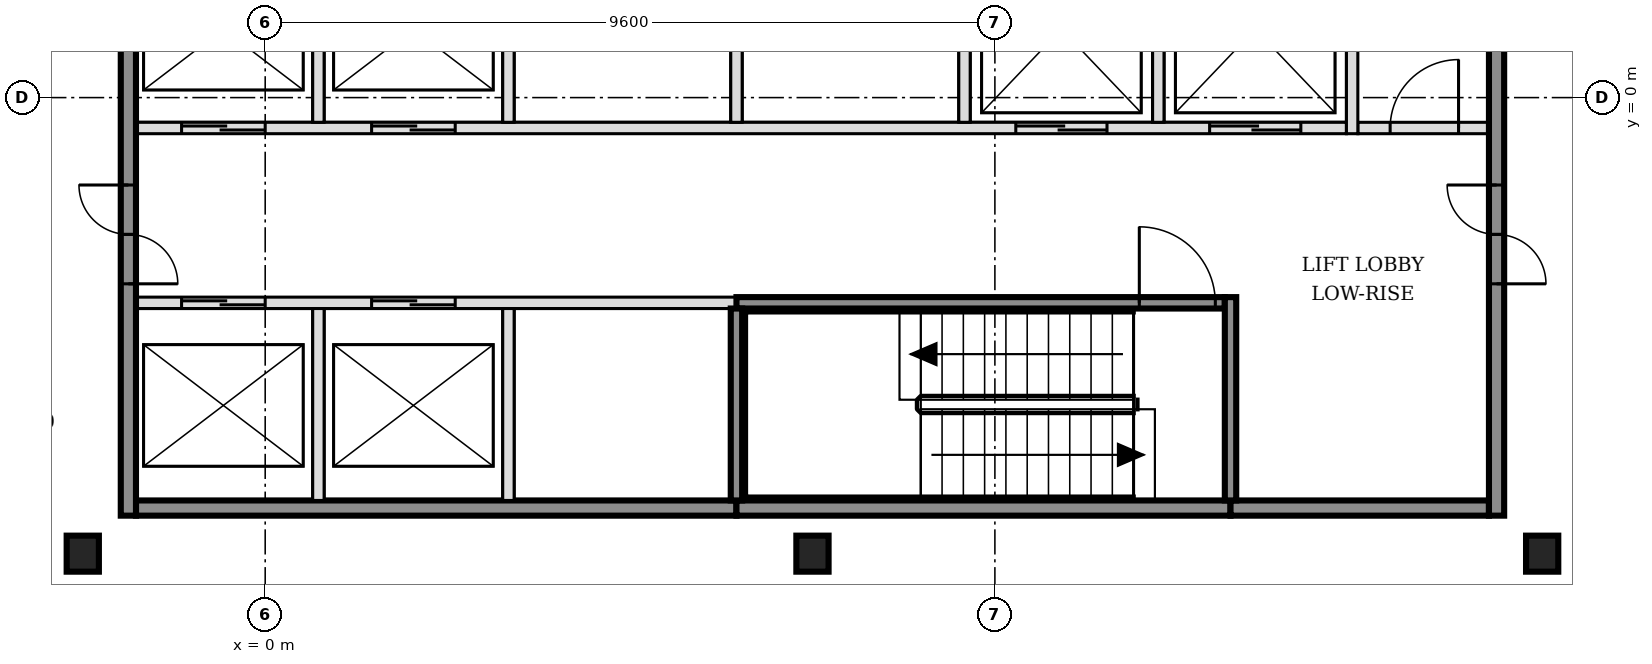
"""IFC4 building model, lengths in metres.
Left out: names, types, materials, properties, quantities, classifications, styles, units other than length and angle.
Written with IfcOpenShell. Run it as: python <this file> out.ifc"""

import sys

from ifc_helpers import new_model, si_unit, direction, frame, frame_2d, origin, origin_2d, place, context, subcontext, project, spatial, rectangle, i_section, extrude, element, fill, save


model = new_model("IFC4")
c1 = context("Model", 3, precision=1e-05, world=origin(), true_north=direction((0.0, 1.0)))
c2 = subcontext(c1, "Body", "Model", "MODEL_VIEW")
j1 = project(units=[si_unit("LENGTHUNIT", "METRE"), si_unit("PLANEANGLEUNIT", "RADIAN")], contexts=[c1])
p1 = place(None, origin())
s1 = spatial("IfcSite", under=j1, at=p1, CompositionType="ELEMENT")
p2 = place(p1, origin())
s2 = spatial("IfcBuilding", under=s1, at=p2, CompositionType="ELEMENT")
p3 = place(p2, frame((0.0, 0.0, 115.8)))
s3 = spatial("IfcBuildingStorey", under=s2, at=p3, CompositionType="ELEMENT", Elevation=115.8)
for number, where, z_axis, x_axis in (
    (1, (-2.4, -6.0, -0.15), (0.0, 0.0, 1.0), (1.0, 0.0, 0.0)),
    (2, (7.2, -6.0, -0.15), (0.0, 0.0, 1.0), (1.0, 0.0, 0.0)),
    (3, (16.8, -6.0, -0.15), (0.0, 0.0, 1.0), (1.0, 0.0, 0.0)),
):
    element("IfcColumn", number, at=place(p3, frame(where, z_axis=z_axis, x_axis=x_axis)), inside=s3, PredefinedType="COLUMN", context=c2, shape_type="SweptSolid", body=[
        extrude(i_section(OverallWidth=0.424, OverallDepth=0.474, WebThickness=0.048, FlangeThickness=0.077, FilletRadius=0.015, at=origin_2d()), origin(), (0.0, 0.0, 1.0), 3.5),
    ])
p4 = place(p3, frame((-1.7, -5.4, 0.0), z_axis=(0.0, 0.0, 1.0), x_axis=(1.0, 0.0, 0.0)))
e4 = element("IfcWall", 4, at=p4, inside=s3, PredefinedType="SOLIDWALL", context=c2, shape_type="SweptSolid", body=[
    extrude(rectangle(XDim=7.9, YDim=0.2, at=frame_2d((3.95, 0.0))), origin(), (0.0, 0.0, 1.0), 3.35),
])
p5 = place(p3, frame((6.2, -5.4, 0.0), z_axis=(0.0, 0.0, 1.0), x_axis=(1.0, 0.0, 0.0)))
e5 = element("IfcWall", 5, at=p5, inside=s3, PredefinedType="SOLIDWALL", context=c2, shape_type="SweptSolid", body=[
    extrude(rectangle(XDim=6.5, YDim=0.2, at=frame_2d((3.25, 0.0))), origin(), (0.0, 0.0, 1.0), 3.35),
])
p6 = place(p3, frame((12.7, -5.4, 0.0), z_axis=(0.0, 0.0, 1.0), x_axis=(1.0, 0.0, 0.0)))
e6 = element("IfcWall", 6, at=p6, inside=s3, PredefinedType="SOLIDWALL", context=c2, shape_type="SweptSolid", body=[
    extrude(rectangle(XDim=3.4, YDim=0.2, at=frame_2d((1.7, 0.0))), origin(), (0.0, 0.0, 1.0), 3.35),
])
p7 = place(p3, frame((-1.7, -2.7, 0.0), z_axis=(0.0, 0.0, 1.0), x_axis=(1.0, 0.0, 0.0)))
e7 = element("IfcWall", 7, at=p7, inside=s3, PredefinedType="SOLIDWALL", context=c2, shape_type="SweptSolid", body=[
    extrude(rectangle(XDim=7.9, YDim=0.15, at=frame_2d((3.95, 0.0))), origin(), (0.0, 0.0, 1.0), 3.35),
])
p8 = place(p7, frame((0.6, 0.0, 0.0)))
e8 = element("IfcOpeningElement", 8, at=p8, cuts=e7, PredefinedType="OPENING", context=c2, shape_type="SweptSolid", body=[
    extrude(rectangle(XDim=1.1, YDim=2.1, at=frame_2d((0.55, 1.05))), frame((0.0, 0.085, 0.0), z_axis=(0.0, -1.0, 0.0), x_axis=(1.0, 0.0, 0.0)), (0.0, 0.0, 1.0), 0.17),
])
p9 = place(p7, frame((3.1, 0.0, 0.0)))
e9 = element("IfcOpeningElement", 9, at=p9, cuts=e7, PredefinedType="OPENING", context=c2, shape_type="SweptSolid", body=[
    extrude(rectangle(XDim=1.1, YDim=2.1, at=frame_2d((0.55, 1.05))), frame((0.0, 0.085, 0.0), z_axis=(0.0, -1.0, 0.0), x_axis=(1.0, 0.0, 0.0)), (0.0, 0.0, 1.0), 0.17),
])
p10 = place(p3, frame((6.2, -2.7, 0.0), z_axis=(0.0, 0.0, 1.0), x_axis=(1.0, 0.0, 0.0)))
e10 = element("IfcWall", 10, at=p10, inside=s3, PredefinedType="SOLIDWALL", context=c2, shape_type="SweptSolid", body=[
    extrude(rectangle(XDim=6.425, YDim=0.15, at=frame_2d((3.212, 0.0))), origin(), (0.0, 0.0, 1.0), 3.35),
])
p11 = place(p10, frame((5.3, 0.0, 0.0)))
e11 = element("IfcOpeningElement", 11, at=p11, cuts=e10, PredefinedType="OPENING", context=c2, shape_type="SweptSolid", body=[
    extrude(rectangle(XDim=1.0, YDim=2.1, at=frame_2d((0.5, 1.05))), frame((0.0, 0.085, 0.0), z_axis=(0.0, -1.0, 0.0), x_axis=(1.0, 0.0, 0.0)), (0.0, 0.0, 1.0), 0.17),
])
p12 = place(p3, frame((-1.7, -0.4, 0.0), z_axis=(0.0, 0.0, 1.0), x_axis=(1.0, 0.0, 0.0)))
e12 = element("IfcWall", 12, at=p12, inside=s3, PredefinedType="SOLIDWALL", context=c2, shape_type="SweptSolid", body=[
    extrude(rectangle(XDim=15.925, YDim=0.15, at=frame_2d((7.962, 0.0))), origin(), (0.0, 0.0, 1.0), 3.35),
])
p13 = place(p12, frame((0.6, 0.0, 0.0)))
e13 = element("IfcOpeningElement", 13, at=p13, cuts=e12, PredefinedType="OPENING", context=c2, shape_type="SweptSolid", body=[
    extrude(rectangle(XDim=1.1, YDim=2.1, at=frame_2d((0.55, 1.05))), frame((0.0, 0.085, 0.0), z_axis=(0.0, -1.0, 0.0), x_axis=(1.0, 0.0, 0.0)), (0.0, 0.0, 1.0), 0.17),
])
p14 = place(p12, frame((3.1, 0.0, 0.0)))
e14 = element("IfcOpeningElement", 14, at=p14, cuts=e12, PredefinedType="OPENING", context=c2, shape_type="SweptSolid", body=[
    extrude(rectangle(XDim=1.1, YDim=2.1, at=frame_2d((0.55, 1.05))), frame((0.0, 0.085, 0.0), z_axis=(0.0, -1.0, 0.0), x_axis=(1.0, 0.0, 0.0)), (0.0, 0.0, 1.0), 0.17),
])
p15 = place(p12, frame((11.575, 0.0, 0.0)))
e15 = element("IfcOpeningElement", 15, at=p15, cuts=e12, PredefinedType="OPENING", context=c2, shape_type="SweptSolid", body=[
    extrude(rectangle(XDim=1.2, YDim=2.1, at=frame_2d((0.6, 1.05))), frame((0.0, 0.085, 0.0), z_axis=(0.0, -1.0, 0.0), x_axis=(1.0, 0.0, 0.0)), (0.0, 0.0, 1.0), 0.17),
])
p16 = place(p12, frame((14.125, 0.0, 0.0)))
e16 = element("IfcOpeningElement", 16, at=p16, cuts=e12, PredefinedType="OPENING", context=c2, shape_type="SweptSolid", body=[
    extrude(rectangle(XDim=1.2, YDim=2.1, at=frame_2d((0.6, 1.05))), frame((0.0, 0.085, 0.0), z_axis=(0.0, -1.0, 0.0), x_axis=(1.0, 0.0, 0.0)), (0.0, 0.0, 1.0), 0.17),
])
p17 = place(p3, frame((14.375, -0.4, 0.0), z_axis=(0.0, 0.0, 1.0), x_axis=(1.0, 0.0, 0.0)))
e17 = element("IfcWall", 17, at=p17, inside=s3, PredefinedType="PARTITIONING", context=c2, shape_type="SweptSolid", body=[
    extrude(rectangle(XDim=1.725, YDim=0.15, at=frame_2d((0.863, 0.0))), origin(), (0.0, 0.0, 1.0), 3.35),
])
p18 = place(p17, frame((0.425, 0.0, 0.0)))
e18 = element("IfcOpeningElement", 18, at=p18, cuts=e17, PredefinedType="OPENING", context=c2, shape_type="SweptSolid", body=[
    extrude(rectangle(XDim=0.9, YDim=2.1, at=frame_2d((0.45, 1.05))), frame((0.0, 0.085, 0.0), z_axis=(0.0, -1.0, 0.0), x_axis=(1.0, 0.0, 0.0)), (0.0, 0.0, 1.0), 0.17),
])
p19 = place(p3, frame((-1.8, -5.5, 0.0), z_axis=(0.0, 0.0, 1.0), x_axis=(0.0, 1.0, 0.0)))
e19 = element("IfcWall", 19, at=p19, inside=s3, PredefinedType="SOLIDWALL", context=c2, shape_type="SweptSolid", body=[
    extrude(rectangle(XDim=15.8, YDim=0.2, at=frame_2d((7.9, 0.0))), origin(), (0.0, 0.0, 1.0), 3.35),
])
p20 = place(p19, frame((3.05, 0.0, 0.0)))
e20 = element("IfcOpeningElement", 20, at=p20, cuts=e19, PredefinedType="OPENING", context=c2, shape_type="SweptSolid", body=[
    extrude(rectangle(XDim=1.3, YDim=2.1, at=frame_2d((0.65, 1.05))), frame((0.0, 0.11, 0.0), z_axis=(0.0, -1.0, 0.0), x_axis=(1.0, 0.0, 0.0)), (0.0, 0.0, 1.0), 0.22),
])
p21 = place(p19, frame((11.45, 0.0, 0.0)))
e21 = element("IfcOpeningElement", 21, at=p21, cuts=e19, PredefinedType="OPENING", context=c2, shape_type="SweptSolid", body=[
    extrude(rectangle(XDim=1.3, YDim=2.1, at=frame_2d((0.65, 1.05))), frame((0.0, 0.11, 0.0), z_axis=(0.0, -1.0, 0.0), x_axis=(1.0, 0.0, 0.0)), (0.0, 0.0, 1.0), 0.22),
])
p22 = place(p3, frame((0.7, -5.3, 0.0), z_axis=(0.0, 0.0, 1.0), x_axis=(0.0, 1.0, 0.0)))
e22 = element("IfcWall", 22, at=p22, inside=s3, PredefinedType="SOLIDWALL", context=c2, shape_type="SweptSolid", body=[
    extrude(rectangle(XDim=2.525, YDim=0.15, at=frame_2d((1.263, 0.0))), origin(), (0.0, 0.0, 1.0), 3.35),
])
p23 = place(p3, frame((0.7, -0.325, 0.0), z_axis=(0.0, 0.0, 1.0), x_axis=(0.0, 1.0, 0.0)))
e23 = element("IfcWall", 23, at=p23, inside=s3, PredefinedType="SOLIDWALL", context=c2, shape_type="SweptSolid", body=[
    extrude(rectangle(XDim=2.45, YDim=0.15, at=frame_2d((1.225, 0.0))), origin(), (0.0, 0.0, 1.0), 3.35),
])
p24 = place(p3, frame((3.2, -5.3, 0.0), z_axis=(0.0, 0.0, 1.0), x_axis=(0.0, 1.0, 0.0)))
e24 = element("IfcWall", 24, at=p24, inside=s3, PredefinedType="SOLIDWALL", context=c2, shape_type="SweptSolid", body=[
    extrude(rectangle(XDim=2.525, YDim=0.15, at=frame_2d((1.263, 0.0))), origin(), (0.0, 0.0, 1.0), 3.35),
])
p25 = place(p3, frame((3.2, -0.325, 0.0), z_axis=(0.0, 0.0, 1.0), x_axis=(0.0, 1.0, 0.0)))
e25 = element("IfcWall", 25, at=p25, inside=s3, PredefinedType="SOLIDWALL", context=c2, shape_type="SweptSolid", body=[
    extrude(rectangle(XDim=2.45, YDim=0.15, at=frame_2d((1.225, 0.0))), origin(), (0.0, 0.0, 1.0), 3.35),
])
p26 = place(p3, frame((6.2, -5.3, 0.0), z_axis=(0.0, 0.0, 1.0), x_axis=(0.0, 1.0, 0.0)))
e26 = element("IfcWall", 26, at=p26, inside=s3, PredefinedType="SOLIDWALL", context=c2, shape_type="SweptSolid", body=[
    extrude(rectangle(XDim=2.525, YDim=0.15, at=frame_2d((1.263, 0.0))), origin(), (0.0, 0.0, 1.0), 3.35),
])
for number, where, z_axis, x_axis in (
    (27, (6.2, -0.325, 0.0), (0.0, 0.0, 1.0), (0.0, 1.0, 0.0)),
    (28, (9.2, -0.325, 0.0), (0.0, 0.0, 1.0), (0.0, 1.0, 0.0)),
    (29, (11.75, -0.325, 0.0), (0.0, 0.0, 1.0), (0.0, 1.0, 0.0)),
):
    element("IfcWall", number, at=place(p3, frame(where, z_axis=z_axis, x_axis=x_axis)), inside=s3, PredefinedType="SOLIDWALL", context=c2, shape_type="SweptSolid", body=[
        extrude(rectangle(XDim=2.45, YDim=0.15, at=frame_2d((1.225, 0.0))), origin(), (0.0, 0.0, 1.0), 3.35),
    ])
p27 = place(p3, frame((12.7, -5.3, 0.0), z_axis=(0.0, 0.0, 1.0), x_axis=(0.0, 1.0, 0.0)))
e30 = element("IfcWall", 30, at=p27, inside=s3, PredefinedType="SOLIDWALL", context=c2, shape_type="SweptSolid", body=[
    extrude(rectangle(XDim=2.675, YDim=0.15, at=frame_2d((1.337, 0.0))), origin(), (0.0, 0.0, 1.0), 3.35),
])
p28 = place(p3, frame((14.3, -0.475, 0.0), z_axis=(0.0, 0.0, 1.0), x_axis=(0.0, 1.0, 0.0)))
e31 = element("IfcWall", 31, at=p28, inside=s3, PredefinedType="SOLIDWALL", context=c2, shape_type="SweptSolid", body=[
    extrude(rectangle(XDim=2.75, YDim=0.15, at=frame_2d((1.375, 0.0))), origin(), (0.0, 0.0, 1.0), 3.35),
])
p29 = place(p3, frame((16.2, -5.5, 0.0), z_axis=(0.0, 0.0, 1.0), x_axis=(0.0, 1.0, 0.0)))
e32 = element("IfcWall", 32, at=p29, inside=s3, PredefinedType="SOLIDWALL", context=c2, shape_type="SweptSolid", body=[
    extrude(rectangle(XDim=15.8, YDim=0.2, at=frame_2d((7.9, 0.0))), origin(), (0.0, 0.0, 1.0), 3.35),
])
p30 = place(p29, frame((3.05, 0.0, 0.0)))
e33 = element("IfcOpeningElement", 33, at=p30, cuts=e32, PredefinedType="OPENING", context=c2, shape_type="SweptSolid", body=[
    extrude(rectangle(XDim=1.3, YDim=2.1, at=frame_2d((0.65, 1.05))), frame((0.0, 0.11, 0.0), z_axis=(0.0, -1.0, 0.0), x_axis=(1.0, 0.0, 0.0)), (0.0, 0.0, 1.0), 0.22),
])
p31 = place(p29, frame((11.45, 0.0, 0.0)))
e34 = element("IfcOpeningElement", 34, at=p31, cuts=e32, PredefinedType="OPENING", context=c2, shape_type="SweptSolid", body=[
    extrude(rectangle(XDim=1.3, YDim=2.1, at=frame_2d((0.65, 1.05))), frame((0.0, 0.11, 0.0), z_axis=(0.0, -1.0, 0.0), x_axis=(1.0, 0.0, 0.0)), (0.0, 0.0, 1.0), 0.22),
])
p32 = place(p8, origin())
e35 = element("IfcDoor", 35, at=p32, inside=s3, OperationType="DOUBLE_DOOR_SLIDING", PredefinedType="DOOR", context=c2, shape_type="SweptSolid", body=[
    extrude(rectangle(XDim=1.1, YDim=2.1, at=frame_2d((0.55, 1.05))), frame((0.0, 0.025, 0.0), z_axis=(0.0, -1.0, 0.0), x_axis=(1.0, 0.0, 0.0)), (0.0, 0.0, 1.0), 0.05),
])
fill(e8, e35)
p33 = place(p9, origin())
e36 = element("IfcDoor", 36, at=p33, inside=s3, OperationType="DOUBLE_DOOR_SLIDING", PredefinedType="DOOR", context=c2, shape_type="SweptSolid", body=[
    extrude(rectangle(XDim=1.1, YDim=2.1, at=frame_2d((0.55, 1.05))), frame((0.0, 0.025, 0.0), z_axis=(0.0, -1.0, 0.0), x_axis=(1.0, 0.0, 0.0)), (0.0, 0.0, 1.0), 0.05),
])
fill(e9, e36)
p34 = place(p13, origin())
e37 = element("IfcDoor", 37, at=p34, inside=s3, OperationType="DOUBLE_DOOR_SLIDING", PredefinedType="DOOR", context=c2, shape_type="SweptSolid", body=[
    extrude(rectangle(XDim=1.1, YDim=2.1, at=frame_2d((0.55, 1.05))), frame((0.0, 0.025, 0.0), z_axis=(0.0, -1.0, 0.0), x_axis=(1.0, 0.0, 0.0)), (0.0, 0.0, 1.0), 0.05),
])
fill(e13, e37)
p35 = place(p14, origin())
e38 = element("IfcDoor", 38, at=p35, inside=s3, OperationType="DOUBLE_DOOR_SLIDING", PredefinedType="DOOR", context=c2, shape_type="SweptSolid", body=[
    extrude(rectangle(XDim=1.1, YDim=2.1, at=frame_2d((0.55, 1.05))), frame((0.0, 0.025, 0.0), z_axis=(0.0, -1.0, 0.0), x_axis=(1.0, 0.0, 0.0)), (0.0, 0.0, 1.0), 0.05),
])
fill(e14, e38)
p36 = place(p15, origin())
e39 = element("IfcDoor", 39, at=p36, inside=s3, OperationType="DOUBLE_DOOR_SLIDING", PredefinedType="DOOR", context=c2, shape_type="SweptSolid", body=[
    extrude(rectangle(XDim=1.2, YDim=2.1, at=frame_2d((0.6, 1.05))), frame((0.0, 0.025, 0.0), z_axis=(0.0, -1.0, 0.0), x_axis=(1.0, 0.0, 0.0)), (0.0, 0.0, 1.0), 0.05),
])
fill(e15, e39)
p37 = place(p16, origin())
e40 = element("IfcDoor", 40, at=p37, inside=s3, OperationType="DOUBLE_DOOR_SLIDING", PredefinedType="DOOR", context=c2, shape_type="SweptSolid", body=[
    extrude(rectangle(XDim=1.2, YDim=2.1, at=frame_2d((0.6, 1.05))), frame((0.0, 0.025, 0.0), z_axis=(0.0, -1.0, 0.0), x_axis=(1.0, 0.0, 0.0)), (0.0, 0.0, 1.0), 0.05),
])
fill(e16, e40)
p38 = place(p11, origin())
e41 = element("IfcDoor", 41, at=p38, inside=s3, OperationType="SINGLE_SWING_LEFT", PredefinedType="DOOR", context=c2, shape_type="SweptSolid", body=[
    extrude(rectangle(XDim=1.0, YDim=2.1, at=frame_2d((0.5, 1.05))), frame((0.0, 0.025, 0.0), z_axis=(0.0, -1.0, 0.0), x_axis=(1.0, 0.0, 0.0)), (0.0, 0.0, 1.0), 0.05),
])
fill(e11, e41)
p39 = place(p20, origin())
e42 = element("IfcDoor", 42, at=p39, inside=s3, OperationType="DOUBLE_DOOR_SINGLE_SWING", PredefinedType="DOOR", context=c2, shape_type="SweptSolid", body=[
    extrude(rectangle(XDim=1.3, YDim=2.1, at=frame_2d((0.65, 1.05))), frame((0.0, 0.025, 0.0), z_axis=(0.0, -1.0, 0.0), x_axis=(1.0, 0.0, 0.0)), (0.0, 0.0, 1.0), 0.05),
])
fill(e20, e42)
p40 = place(p30, origin())
e43 = element("IfcDoor", 43, at=p40, inside=s3, OperationType="DOUBLE_DOOR_SINGLE_SWING", PredefinedType="DOOR", context=c2, shape_type="SweptSolid", body=[
    extrude(rectangle(XDim=1.3, YDim=2.1, at=frame_2d((0.65, 1.05))), frame((0.0, 0.025, 0.0), z_axis=(0.0, -1.0, 0.0), x_axis=(1.0, 0.0, 0.0)), (0.0, 0.0, 1.0), 0.05),
])
fill(e33, e43)
p41 = place(p18, origin())
e44 = element("IfcDoor", 44, at=p41, inside=s3, OperationType="SINGLE_SWING_RIGHT", PredefinedType="DOOR", context=c2, shape_type="SweptSolid", body=[
    extrude(rectangle(XDim=0.9, YDim=2.1, at=frame_2d((0.45, 1.05))), frame((0.0, 0.025, 0.0), z_axis=(0.0, -1.0, 0.0), x_axis=(1.0, 0.0, 0.0)), (0.0, 0.0, 1.0), 0.05),
])
fill(e18, e44)
save(model, sys.argv[1])
